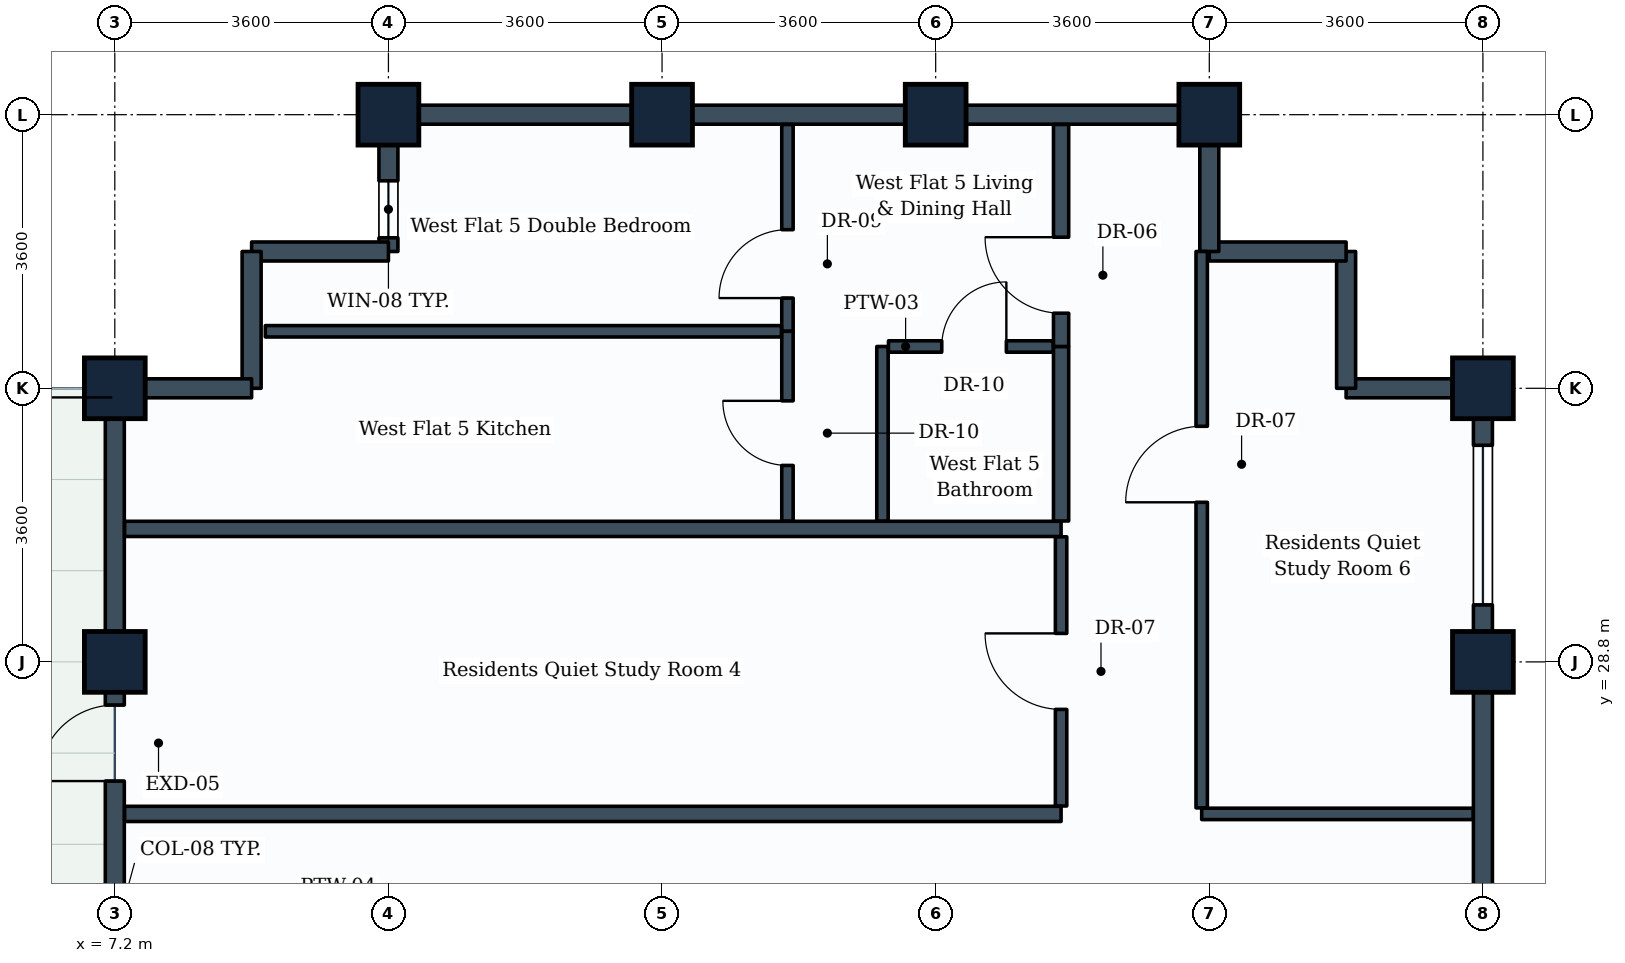
"""IFC4 building model, lengths in metres.
Left out: names, types, materials, properties, quantities, classifications, styles, units other than length and angle.
Written with IfcOpenShell. Run it as: python <this file> out.ifc"""

import sys

from ifc_helpers import new_model, si_unit, direction, frame, frame_2d, origin, origin_2d, place, context, subcontext, project, spatial, rectangle, extrude, element, fill, save


model = new_model("IFC4")
c1 = context("Model", 3, precision=1e-05, world=origin(), true_north=direction((0.0, 1.0)))
c2 = subcontext(c1, "Body", "Model", "MODEL_VIEW")
j1 = project(units=[si_unit("LENGTHUNIT", "METRE"), si_unit("PLANEANGLEUNIT", "RADIAN")], contexts=[c1])
p1 = place(None, origin())
s1 = spatial("IfcSite", under=j1, at=p1, CompositionType="ELEMENT")
p2 = place(p1, origin())
s2 = spatial("IfcBuilding", under=s1, at=p2, CompositionType="ELEMENT")
p3 = place(p2, frame((0.0, 0.0, 270.2)))
s3 = spatial("IfcBuildingStorey", under=s2, at=p3, CompositionType="ELEMENT", Elevation=270.2)
for number, where, z_axis, x_axis in (
    (1, (7.2, 28.8, 0.0), (0.0, 0.0, 1.0), (0.0, 1.0, 0.0)),
    (2, (7.2, 32.4, 0.0), (0.0, 0.0, 1.0), (0.0, 1.0, 0.0)),
    (3, (10.8, 36.0, 0.0), (0.0, 0.0, 1.0), (1.0, 0.0, 0.0)),
    (4, (14.4, 36.0, 0.0), (0.0, 0.0, 1.0), (1.0, 0.0, 0.0)),
    (5, (18.0, 36.0, 0.0), (0.0, 0.0, 1.0), (1.0, 0.0, 0.0)),
    (6, (21.6, 36.0, 0.0), (0.0, 0.0, 1.0), (1.0, 0.0, 0.0)),
    (7, (25.2, 28.8, 0.0), (0.0, 0.0, 1.0), (0.0, 1.0, 0.0)),
    (8, (25.2, 32.4, 0.0), (0.0, 0.0, 1.0), (0.0, 1.0, 0.0)),
):
    element("IfcColumn", number, at=place(p3, frame(where, z_axis=z_axis, x_axis=x_axis)), inside=s3, PredefinedType="COLUMN", context=c2, shape_type="SweptSolid", body=[
        extrude(rectangle(XDim=0.8, YDim=0.8, at=origin_2d()), origin(), (0.0, 0.0, 1.0), 3.6),
    ])
p4 = place(p3, frame((25.2, 28.8, 0.0), z_axis=(0.0, 0.0, 1.0), x_axis=(0.0, -1.0, 0.0)))
e9 = element("IfcWall", 9, at=p4, inside=s3, PredefinedType="STANDARD", context=c2, shape_type="SweptSolid", body=[
    extrude(rectangle(XDim=3.6, YDim=0.25, at=frame_2d((1.8, 0.0))), origin(), (0.0, 0.0, 1.0), 2.83),
])
p5 = place(p3, frame((25.2, 32.4, 0.0), z_axis=(0.0, 0.0, 1.0), x_axis=(0.0, -1.0, 0.0)))
e10 = element("IfcWall", 10, at=p5, inside=s3, PredefinedType="STANDARD", context=c2, shape_type="SweptSolid", body=[
    extrude(rectangle(XDim=3.6, YDim=0.25, at=frame_2d((1.8, 0.0))), origin(), (0.0, 0.0, 1.0), 2.83),
])
p6 = place(p5, frame((0.75, 0.0, 0.85)))
e11 = element("IfcOpeningElement", 11, at=p6, cuts=e10, PredefinedType="OPENING", context=c2, shape_type="SweptSolid", body=[
    extrude(rectangle(XDim=2.1, YDim=1.35, at=frame_2d((1.05, 0.675))), frame((0.0, 0.135, 0.0), z_axis=(0.0, -1.0, 0.0), x_axis=(1.0, 0.0, 0.0)), (0.0, 0.0, 1.0), 0.27),
])
p7 = place(p3, frame((23.4, 32.4, 0.0), z_axis=(0.0, 0.0, 1.0), x_axis=(1.0, 0.0, 0.0)))
e12 = element("IfcWall", 12, at=p7, inside=s3, PredefinedType="STANDARD", context=c2, shape_type="SweptSolid", body=[
    extrude(rectangle(XDim=1.8, YDim=0.25, at=frame_2d((0.9, 0.0))), origin(), (0.0, 0.0, 1.0), 2.83),
])
p8 = place(p3, frame((23.4, 32.4, 0.0), z_axis=(0.0, 0.0, 1.0), x_axis=(0.0, 1.0, 0.0)))
e13 = element("IfcWall", 13, at=p8, inside=s3, PredefinedType="STANDARD", context=c2, shape_type="SweptSolid", body=[
    extrude(rectangle(XDim=1.8, YDim=0.25, at=frame_2d((0.9, 0.0))), origin(), (0.0, 0.0, 1.0), 3.335),
])
p9 = place(p3, frame((21.6, 34.2, 0.0), z_axis=(0.0, 0.0, 1.0), x_axis=(1.0, 0.0, 0.0)))
e14 = element("IfcWall", 14, at=p9, inside=s3, PredefinedType="STANDARD", context=c2, shape_type="SweptSolid", body=[
    extrude(rectangle(XDim=1.8, YDim=0.25, at=frame_2d((0.9, 0.0))), origin(), (0.0, 0.0, 1.0), 3.335),
])
p10 = place(p3, frame((21.6, 34.2, 0.0), z_axis=(0.0, 0.0, 1.0), x_axis=(0.0, 1.0, 0.0)))
e15 = element("IfcWall", 15, at=p10, inside=s3, PredefinedType="STANDARD", context=c2, shape_type="SweptSolid", body=[
    extrude(rectangle(XDim=1.8, YDim=0.25, at=frame_2d((0.9, 0.0))), origin(), (0.0, 0.0, 1.0), 2.83),
])
for number, where, z_axis, x_axis in (
    (16, (18.0, 36.0, 0.0), (0.0, 0.0, 1.0), (1.0, 0.0, 0.0)),
    (17, (14.4, 36.0, 0.0), (0.0, 0.0, 1.0), (1.0, 0.0, 0.0)),
):
    element("IfcWall", number, at=place(p3, frame(where, z_axis=z_axis, x_axis=x_axis)), inside=s3, PredefinedType="STANDARD", context=c2, shape_type="SweptSolid", body=[
        extrude(rectangle(XDim=3.6, YDim=0.25, at=frame_2d((1.8, 0.0))), origin(), (0.0, 0.0, 1.0), 2.83),
    ])
p11 = place(p3, frame((10.8, 36.0, 0.0), z_axis=(0.0, 0.0, 1.0), x_axis=(1.0, 0.0, 0.0)))
e18 = element("IfcWall", 18, at=p11, inside=s3, PredefinedType="STANDARD", context=c2, shape_type="SweptSolid", body=[
    extrude(rectangle(XDim=3.6, YDim=0.25, at=frame_2d((1.8, 0.0))), origin(), (0.0, 0.0, 1.0), 2.83),
])
p12 = place(p3, frame((10.8, 34.2, 0.0), z_axis=(0.0, 0.0, 1.0), x_axis=(0.0, 1.0, 0.0)))
e19 = element("IfcWall", 19, at=p12, inside=s3, PredefinedType="STANDARD", context=c2, shape_type="SweptSolid", body=[
    extrude(rectangle(XDim=1.8, YDim=0.25, at=frame_2d((0.9, 0.0))), origin(), (0.0, 0.0, 1.0), 2.83),
])
p13 = place(p12, frame((0.18, 0.0, 0.85)))
e20 = element("IfcOpeningElement", 20, at=p13, cuts=e19, PredefinedType="OPENING", context=c2, shape_type="SweptSolid", body=[
    extrude(rectangle(XDim=0.75, YDim=1.05, at=frame_2d((0.375, 0.525))), frame((0.0, 0.135, 0.0), z_axis=(0.0, -1.0, 0.0), x_axis=(1.0, 0.0, 0.0)), (0.0, 0.0, 1.0), 0.27),
])
for number, where, z_axis, x_axis in (
    (21, (9.0, 34.2, 0.0), (0.0, 0.0, 1.0), (1.0, 0.0, 0.0)),
    (22, (9.0, 32.4, 0.0), (0.0, 0.0, 1.0), (0.0, 1.0, 0.0)),
):
    element("IfcWall", number, at=place(p3, frame(where, z_axis=z_axis, x_axis=x_axis)), inside=s3, PredefinedType="STANDARD", context=c2, shape_type="SweptSolid", body=[
        extrude(rectangle(XDim=1.8, YDim=0.25, at=frame_2d((0.9, 0.0))), origin(), (0.0, 0.0, 1.0), 3.335),
    ])
p14 = place(p3, frame((7.2, 32.4, 0.0), z_axis=(0.0, 0.0, 1.0), x_axis=(1.0, 0.0, 0.0)))
e23 = element("IfcWall", 23, at=p14, inside=s3, PredefinedType="STANDARD", context=c2, shape_type="SweptSolid", body=[
    extrude(rectangle(XDim=1.8, YDim=0.25, at=frame_2d((0.9, 0.0))), origin(), (0.0, 0.0, 1.0), 2.83),
])
p15 = place(p3, frame((7.2, 28.8, 0.0), z_axis=(0.0, 0.0, 1.0), x_axis=(0.0, 1.0, 0.0)))
e24 = element("IfcWall", 24, at=p15, inside=s3, PredefinedType="STANDARD", context=c2, shape_type="SweptSolid", body=[
    extrude(rectangle(XDim=3.6, YDim=0.25, at=frame_2d((1.8, 0.0))), origin(), (0.0, 0.0, 1.0), 2.83),
])
p16 = place(p3, frame((7.2, 25.2, 0.0), z_axis=(0.0, 0.0, 1.0), x_axis=(0.0, 1.0, 0.0)))
e25 = element("IfcWall", 25, at=p16, inside=s3, PredefinedType="STANDARD", context=c2, shape_type="SweptSolid", body=[
    extrude(rectangle(XDim=3.6, YDim=0.25, at=frame_2d((1.8, 0.0))), origin(), (0.0, 0.0, 1.0), 2.83),
])
p17 = place(p16, frame((2.032, 0.0, 0.0)))
e26 = element("IfcOpeningElement", 26, at=p17, cuts=e25, PredefinedType="OPENING", context=c2, shape_type="SweptSolid", body=[
    extrude(rectangle(XDim=1.0, YDim=2.1, at=frame_2d((0.5, 1.05))), frame((0.0, 0.135, 0.0), z_axis=(0.0, -1.0, 0.0), x_axis=(1.0, 0.0, 0.0)), (0.0, 0.0, 1.0), 0.27),
])
for number, where, z_axis, x_axis in (
    (27, (7.329, 26.8, 0.0), (0.0, 0.0, 1.0), (1.0, 0.0, 0.0)),
    (28, (7.329, 30.55, 0.0), (0.0, 0.0, 1.0), (1.0, 0.0, 0.0)),
):
    element("IfcWall", number, at=place(p3, frame(where, z_axis=z_axis, x_axis=x_axis)), inside=s3, PredefinedType="PARTITIONING", context=c2, shape_type="SweptSolid", body=[
        extrude(rectangle(XDim=12.321, YDim=0.2, at=frame_2d((6.16, 0.0))), origin(), (0.0, 0.0, 1.0), 2.83),
    ])
p18 = place(p3, frame((19.65, 26.904, 0.0), z_axis=(0.0, 0.0, 1.0), x_axis=(0.0, 1.0, 0.0)))
e29 = element("IfcWall", 29, at=p18, inside=s3, PredefinedType="PARTITIONING", context=c2, shape_type="SweptSolid", body=[
    extrude(rectangle(XDim=3.542, YDim=0.15, at=frame_2d((1.771, 0.0))), origin(), (0.0, 0.0, 1.0), 3.03),
])
p19 = place(p18, frame((1.271, 0.0, 0.0)))
e30 = element("IfcOpeningElement", 30, at=p19, cuts=e29, PredefinedType="OPENING", context=c2, shape_type="SweptSolid", body=[
    extrude(rectangle(XDim=1.0, YDim=2.1, at=frame_2d((0.5, 1.05))), frame((0.0, 0.085, 0.0), z_axis=(0.0, -1.0, 0.0), x_axis=(1.0, 0.0, 0.0)), (0.0, 0.0, 1.0), 0.17),
])
p20 = place(p3, frame((19.65, 30.654, 0.0), z_axis=(0.0, 0.0, 1.0), x_axis=(0.0, 1.0, 0.0)))
e31 = element("IfcWall", 31, at=p20, inside=s3, PredefinedType="PARTITIONING", context=c2, shape_type="SweptSolid", body=[
    extrude(rectangle(XDim=2.296, YDim=0.2, at=frame_2d((1.148, 0.0))), origin(), (0.0, 0.0, 1.0), 3.335),
])
p21 = place(p3, frame((17.3, 30.654, 0.0), z_axis=(0.0, 0.0, 1.0), x_axis=(0.0, 1.0, 0.0)))
e32 = element("IfcWall", 32, at=p21, inside=s3, PredefinedType="PARTITIONING", context=c2, shape_type="SweptSolid", body=[
    extrude(rectangle(XDim=2.296, YDim=0.15, at=frame_2d((1.148, 0.0))), origin(), (0.0, 0.0, 1.0), 3.335),
])
p22 = place(p3, frame((17.379, 32.95, 0.0), z_axis=(0.0, 0.0, 1.0), x_axis=(1.0, 0.0, 0.0)))
e33 = element("IfcWall", 33, at=p22, inside=s3, PredefinedType="PARTITIONING", context=c2, shape_type="SweptSolid", body=[
    extrude(rectangle(XDim=2.167, YDim=0.15, at=frame_2d((1.083, 0.0))), origin(), (0.0, 0.0, 1.0), 3.03),
])
p23 = place(p22, frame((0.701, 0.0, 0.0)))
e34 = element("IfcOpeningElement", 34, at=p23, cuts=e33, PredefinedType="OPENING", context=c2, shape_type="SweptSolid", body=[
    extrude(rectangle(XDim=0.85, YDim=2.1, at=frame_2d((0.425, 1.05))), frame((0.0, 0.085, 0.0), z_axis=(0.0, -1.0, 0.0), x_axis=(1.0, 0.0, 0.0)), (0.0, 0.0, 1.0), 0.17),
])
p24 = place(p3, frame((19.65, 32.95, 0.0), z_axis=(0.0, 0.0, 1.0), x_axis=(0.0, 1.0, 0.0)))
e35 = element("IfcWall", 35, at=p24, inside=s3, PredefinedType="PARTITIONING", context=c2, shape_type="SweptSolid", body=[
    extrude(rectangle(XDim=2.921, YDim=0.2, at=frame_2d((1.46, 0.0))), origin(), (0.0, 0.0, 1.0), 2.83),
])
p25 = place(p24, frame((0.438, 0.0, 0.0)))
e36 = element("IfcOpeningElement", 36, at=p25, cuts=e35, PredefinedType="OPENING", context=c2, shape_type="SweptSolid", body=[
    extrude(rectangle(XDim=1.0, YDim=2.1, at=frame_2d((0.5, 1.05))), frame((0.0, 0.11, 0.0), z_axis=(0.0, -1.0, 0.0), x_axis=(1.0, 0.0, 0.0)), (0.0, 0.0, 1.0), 0.22),
])
p26 = place(p3, frame((16.05, 33.15, 0.0), z_axis=(0.0, 0.0, 1.0), x_axis=(0.0, 1.0, 0.0)))
e37 = element("IfcWall", 37, at=p26, inside=s3, PredefinedType="PARTITIONING", context=c2, shape_type="SweptSolid", body=[
    extrude(rectangle(XDim=2.721, YDim=0.15, at=frame_2d((1.361, 0.0))), origin(), (0.0, 0.0, 1.0), 2.83),
])
p27 = place(p26, frame((0.437, 0.0, 0.0)))
e38 = element("IfcOpeningElement", 38, at=p27, cuts=e37, PredefinedType="OPENING", context=c2, shape_type="SweptSolid", body=[
    extrude(rectangle(XDim=0.9, YDim=2.1, at=frame_2d((0.45, 1.05))), frame((0.0, 0.085, 0.0), z_axis=(0.0, -1.0, 0.0), x_axis=(1.0, 0.0, 0.0)), (0.0, 0.0, 1.0), 0.17),
])
p28 = place(p3, frame((16.05, 30.654, 0.0), z_axis=(0.0, 0.0, 1.0), x_axis=(0.0, 1.0, 0.0)))
e39 = element("IfcWall", 39, at=p28, inside=s3, PredefinedType="PARTITIONING", context=c2, shape_type="SweptSolid", body=[
    extrude(rectangle(XDim=2.496, YDim=0.15, at=frame_2d((1.248, 0.0))), origin(), (0.0, 0.0, 1.0), 3.335),
])
p29 = place(p28, frame((0.731, 0.0, 0.0)))
e40 = element("IfcOpeningElement", 40, at=p29, cuts=e39, PredefinedType="OPENING", context=c2, shape_type="SweptSolid", body=[
    extrude(rectangle(XDim=0.85, YDim=2.1, at=frame_2d((0.425, 1.05))), frame((0.0, 0.085, 0.0), z_axis=(0.0, -1.0, 0.0), x_axis=(1.0, 0.0, 0.0)), (0.0, 0.0, 1.0), 0.17),
])
p30 = place(p3, frame((9.18, 33.15, 0.0), z_axis=(0.0, 0.0, 1.0), x_axis=(1.0, 0.0, 0.0)))
e41 = element("IfcWall", 41, at=p30, inside=s3, PredefinedType="PARTITIONING", context=c2, shape_type="SweptSolid", body=[
    extrude(rectangle(XDim=6.791, YDim=0.15, at=frame_2d((3.396, 0.0))), origin(), (0.0, 0.0, 1.0), 3.335),
])
p31 = place(p3, frame((21.5, 26.8, 0.0), z_axis=(0.0, 0.0, 1.0), x_axis=(1.0, 0.0, 0.0)))
e42 = element("IfcWall", 42, at=p31, inside=s3, PredefinedType="PARTITIONING", context=c2, shape_type="SweptSolid", body=[
    extrude(rectangle(XDim=3.571, YDim=0.15, at=frame_2d((1.786, 0.0))), origin(), (0.0, 0.0, 1.0), 2.83),
])
p32 = place(p3, frame((21.5, 26.879, 0.0), z_axis=(0.0, 0.0, 1.0), x_axis=(0.0, 1.0, 0.0)))
e43 = element("IfcWall", 43, at=p32, inside=s3, PredefinedType="PARTITIONING", context=c2, shape_type="SweptSolid", body=[
    extrude(rectangle(XDim=7.321, YDim=0.15, at=frame_2d((3.661, 0.0))), origin(), (0.0, 0.0, 1.0), 3.03),
])
p33 = place(p32, frame((4.021, 0.0, 0.0)))
e44 = element("IfcOpeningElement", 44, at=p33, cuts=e43, PredefinedType="OPENING", context=c2, shape_type="SweptSolid", body=[
    extrude(rectangle(XDim=1.0, YDim=2.1, at=frame_2d((0.5, 1.05))), frame((0.0, 0.085, 0.0), z_axis=(0.0, -1.0, 0.0), x_axis=(1.0, 0.0, 0.0)), (0.0, 0.0, 1.0), 0.17),
])
p34 = place(p6, origin())
e45 = element("IfcWindow", 45, at=p34, inside=s3, PartitioningType="SINGLE_PANEL", PredefinedType="WINDOW", context=c2, shape_type="SweptSolid", body=[
    extrude(rectangle(XDim=2.1, YDim=1.35, at=frame_2d((1.05, 0.675))), frame((0.0, 0.03, 0.0), z_axis=(0.0, -1.0, 0.0), x_axis=(1.0, 0.0, 0.0)), (0.0, 0.0, 1.0), 0.06),
])
fill(e11, e45)
p35 = place(p17, origin())
e46 = element("IfcDoor", 46, at=p35, inside=s3, OperationType="SINGLE_SWING_LEFT", PredefinedType="DOOR", context=c2, shape_type="SweptSolid", body=[
    extrude(rectangle(XDim=1.0, YDim=2.1, at=frame_2d((0.5, 1.05))), frame((0.0, 0.025, 0.0), z_axis=(0.0, -1.0, 0.0), x_axis=(1.0, 0.0, 0.0)), (0.0, 0.0, 1.0), 0.05),
])
fill(e26, e46)
p36 = place(p19, origin())
e47 = element("IfcDoor", 47, at=p36, inside=s3, OperationType="SINGLE_SWING_RIGHT", PredefinedType="DOOR", context=c2, shape_type="SweptSolid", body=[
    extrude(rectangle(XDim=1.0, YDim=2.1, at=frame_2d((0.5, 1.05))), frame((0.0, 0.025, 0.0), z_axis=(0.0, -1.0, 0.0), x_axis=(1.0, 0.0, 0.0)), (0.0, 0.0, 1.0), 0.05),
])
fill(e30, e47)
p37 = place(p23, origin())
e48 = element("IfcDoor", 48, at=p37, inside=s3, OperationType="SINGLE_SWING_RIGHT", PredefinedType="DOOR", context=c2, shape_type="SweptSolid", body=[
    extrude(rectangle(XDim=0.85, YDim=2.1, at=frame_2d((0.425, 1.05))), frame((0.0, 0.025, 0.0), z_axis=(0.0, -1.0, 0.0), x_axis=(1.0, 0.0, 0.0)), (0.0, 0.0, 1.0), 0.05),
])
fill(e34, e48)
p38 = place(p25, origin())
e49 = element("IfcDoor", 49, at=p38, inside=s3, OperationType="SINGLE_SWING_RIGHT", PredefinedType="DOOR", context=c2, shape_type="SweptSolid", body=[
    extrude(rectangle(XDim=1.0, YDim=2.1, at=frame_2d((0.5, 1.05))), frame((0.0, 0.025, 0.0), z_axis=(0.0, -1.0, 0.0), x_axis=(1.0, 0.0, 0.0)), (0.0, 0.0, 1.0), 0.05),
])
fill(e36, e49)
p39 = place(p27, origin())
e50 = element("IfcDoor", 50, at=p39, inside=s3, OperationType="SINGLE_SWING_LEFT", PredefinedType="DOOR", context=c2, shape_type="SweptSolid", body=[
    extrude(rectangle(XDim=0.9, YDim=2.1, at=frame_2d((0.45, 1.05))), frame((0.0, 0.025, 0.0), z_axis=(0.0, -1.0, 0.0), x_axis=(1.0, 0.0, 0.0)), (0.0, 0.0, 1.0), 0.05),
])
fill(e38, e50)
p40 = place(p29, origin())
e51 = element("IfcDoor", 51, at=p40, inside=s3, OperationType="SINGLE_SWING_RIGHT", PredefinedType="DOOR", context=c2, shape_type="SweptSolid", body=[
    extrude(rectangle(XDim=0.85, YDim=2.1, at=frame_2d((0.425, 1.05))), frame((0.0, 0.025, 0.0), z_axis=(0.0, -1.0, 0.0), x_axis=(1.0, 0.0, 0.0)), (0.0, 0.0, 1.0), 0.05),
])
fill(e40, e51)
p41 = place(p33, origin())
e52 = element("IfcDoor", 52, at=p41, inside=s3, OperationType="SINGLE_SWING_LEFT", PredefinedType="DOOR", context=c2, shape_type="SweptSolid", body=[
    extrude(rectangle(XDim=1.0, YDim=2.1, at=frame_2d((0.5, 1.05))), frame((0.0, 0.025, 0.0), z_axis=(0.0, -1.0, 0.0), x_axis=(1.0, 0.0, 0.0)), (0.0, 0.0, 1.0), 0.05),
])
fill(e44, e52)
p42 = place(p13, origin())
e53 = element("IfcWindow", 53, at=p42, inside=s3, PartitioningType="SINGLE_PANEL", PredefinedType="WINDOW", context=c2, shape_type="SweptSolid", body=[
    extrude(rectangle(XDim=0.75, YDim=1.05, at=frame_2d((0.375, 0.525))), frame((0.0, 0.03, 0.0), z_axis=(0.0, -1.0, 0.0), x_axis=(1.0, 0.0, 0.0)), (0.0, 0.0, 1.0), 0.06),
])
fill(e20, e53)
save(model, sys.argv[1])
